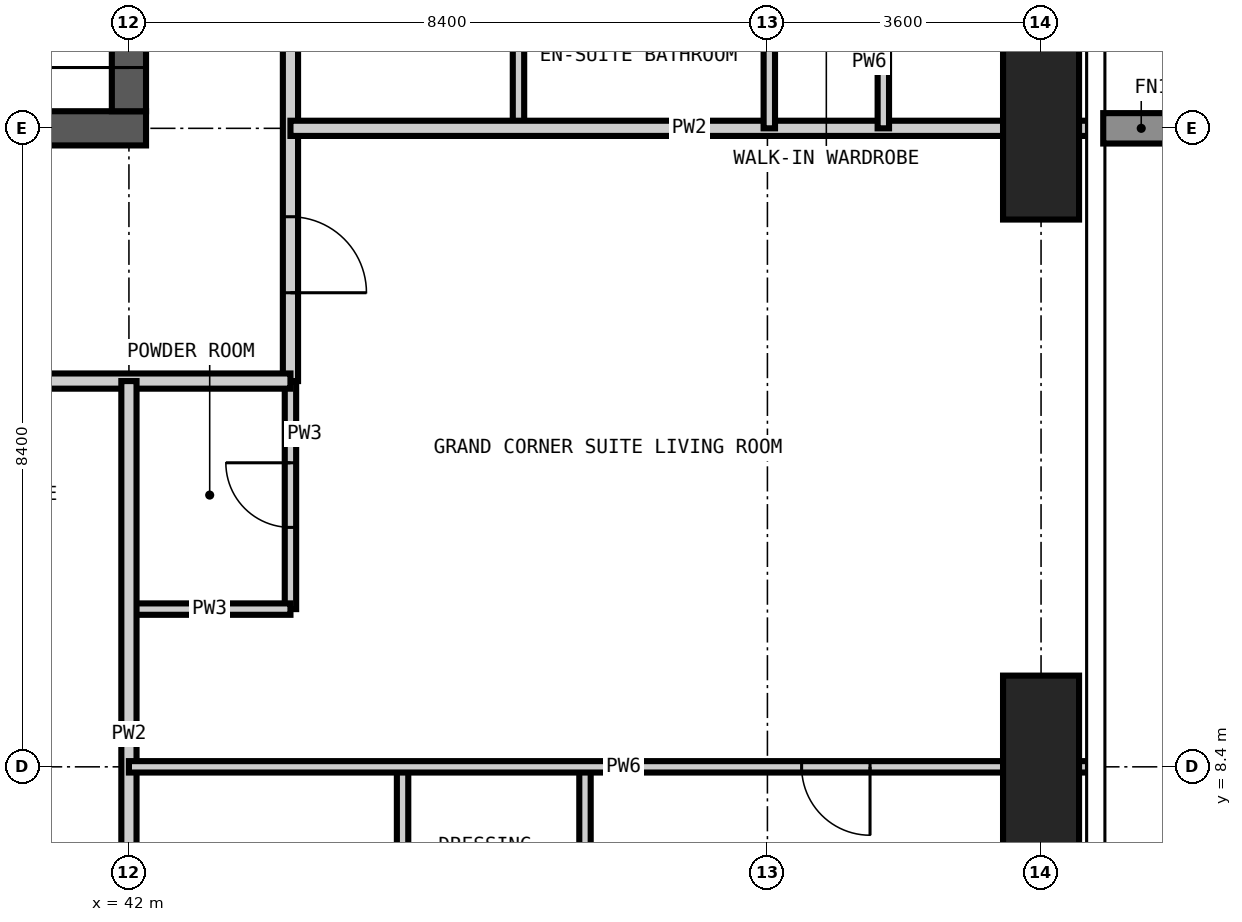
"""IFC4 building model, lengths in metres.
Left out: names, types, materials, properties, quantities, classifications, styles, units other than length and angle.
Written with IfcOpenShell. Run it as: python <this file> out.ifc"""

import sys

from ifc_helpers import new_model, si_unit, direction, frame, frame_2d, origin, origin_2d, place, context, subcontext, project, spatial, rectangle, extrude, element, fill, save


model = new_model("IFC4")
c1 = context("Model", 3, precision=1e-05, world=origin(), true_north=direction((0.0, 1.0)))
c2 = subcontext(c1, "Body", "Model", "MODEL_VIEW")
j1 = project(units=[si_unit("LENGTHUNIT", "METRE"), si_unit("PLANEANGLEUNIT", "RADIAN")], contexts=[c1])
p1 = place(None, origin())
s1 = spatial("IfcSite", under=j1, at=p1, CompositionType="ELEMENT")
p2 = place(p1, origin())
s2 = spatial("IfcBuilding", under=s1, at=p2, CompositionType="ELEMENT")
p3 = place(p2, frame((0.0, 0.0, 241.2)))
s3 = spatial("IfcBuildingStorey", under=s2, at=p3, CompositionType="ELEMENT", Elevation=241.2)
for number, where, z_axis, x_axis in (
    (1, (54.0, 8.4, -0.35), (0.0, 0.0, 1.0), (1.0, 0.0, 0.0)),
    (2, (54.0, 16.8, -0.35), (0.0, 0.0, 1.0), (1.0, 0.0, 0.0)),
):
    element("IfcColumn", number, at=place(p3, frame(where, z_axis=z_axis, x_axis=x_axis)), inside=s3, PredefinedType="COLUMN", context=c2, shape_type="SweptSolid", body=[
        extrude(rectangle(XDim=1.0, YDim=2.4, at=origin_2d()), origin(), (0.0, 0.0, 1.0), 3.9),
    ])
p4 = place(p3, frame((24.975, 16.8, -0.35), z_axis=(0.0, 0.0, 1.0), x_axis=(1.0, 0.0, 0.0)))
e3 = element("IfcWall", 3, at=p4, inside=s3, PredefinedType="SHEAR", context=c2, shape_type="SweptSolid", body=[
    extrude(rectangle(XDim=17.25, YDim=0.45, at=frame_2d((8.625, 0.0))), origin(), (0.0, 0.0, 1.0), 3.9),
])
p5 = place(p4, frame((3.925, 0.0, 0.35)))
e4 = element("IfcOpeningElement", 4, at=p5, cuts=e3, PredefinedType="OPENING", context=c2, shape_type="SweptSolid", body=[
    extrude(rectangle(XDim=1.0, YDim=2.1, at=frame_2d((0.5, 1.05))), frame((0.0, 0.235, 0.0), z_axis=(0.0, -1.0, 0.0), x_axis=(1.0, 0.0, 0.0)), (0.0, 0.0, 1.0), 0.47),
])
p6 = place(p4, frame((10.225, 0.0, 0.35)))
e5 = element("IfcOpeningElement", 5, at=p6, cuts=e3, PredefinedType="OPENING", context=c2, shape_type="SweptSolid", body=[
    extrude(rectangle(XDim=1.0, YDim=2.1, at=frame_2d((0.5, 1.05))), frame((0.0, 0.235, 0.0), z_axis=(0.0, -1.0, 0.0), x_axis=(1.0, 0.0, 0.0)), (0.0, 0.0, 1.0), 0.47),
])
p7 = place(p3, frame((42.0, 17.025, -0.35), z_axis=(0.0, 0.0, 1.0), x_axis=(0.0, 1.0, 0.0)))
e6 = element("IfcWall", 6, at=p7, inside=s3, PredefinedType="SHEAR", context=c2, shape_type="SweptSolid", body=[
    extrude(rectangle(XDim=24.75, YDim=0.45, at=frame_2d((12.375, 0.0))), origin(), (0.0, 0.0, 1.0), 3.9),
])
p8 = place(p7, frame((0.575, 0.0, 0.35)))
e7 = element("IfcOpeningElement", 7, at=p8, cuts=e6, PredefinedType="OPENING", context=c2, shape_type="SweptSolid", body=[
    extrude(rectangle(XDim=1.2, YDim=2.2, at=frame_2d((0.6, 1.1))), frame((0.0, 0.235, 0.0), z_axis=(0.0, -1.0, 0.0), x_axis=(1.0, 0.0, 0.0)), (0.0, 0.0, 1.0), 0.47),
])
p9 = place(p7, frame((11.475, 0.0, 0.35)))
e8 = element("IfcOpeningElement", 8, at=p9, cuts=e6, PredefinedType="OPENING", context=c2, shape_type="SweptSolid", body=[
    extrude(rectangle(XDim=1.8, YDim=2.2, at=frame_2d((0.9, 1.1))), frame((0.0, 0.235, 0.0), z_axis=(0.0, -1.0, 0.0), x_axis=(1.0, 0.0, 0.0)), (0.0, 0.0, 1.0), 0.47),
])
p10 = place(p7, frame((20.275, 0.0, 0.35)))
e9 = element("IfcOpeningElement", 9, at=p10, cuts=e6, PredefinedType="OPENING", context=c2, shape_type="SweptSolid", body=[
    extrude(rectangle(XDim=1.0, YDim=2.1, at=frame_2d((0.5, 1.05))), frame((0.0, 0.235, 0.0), z_axis=(0.0, -1.0, 0.0), x_axis=(1.0, 0.0, 0.0)), (0.0, 0.0, 1.0), 0.47),
])
p11 = place(p3, frame((44.125, 10.475, 0.0), z_axis=(0.0, 0.0, 1.0), x_axis=(0.0, 1.0, 0.0)))
e10 = element("IfcWall", 10, at=p11, inside=s3, PredefinedType="PARTITIONING", context=c2, shape_type="SweptSolid", body=[
    extrude(rectangle(XDim=3.0, YDim=0.15, at=frame_2d((1.5, 0.0))), origin(), (0.0, 0.0, 1.0), 3.55),
])
p12 = place(p11, frame((1.075, 0.0, 0.0)))
e11 = element("IfcOpeningElement", 11, at=p12, cuts=e10, PredefinedType="OPENING", context=c2, shape_type="SweptSolid", body=[
    extrude(rectangle(XDim=0.85, YDim=2.1, at=frame_2d((0.425, 1.05))), frame((0.0, 0.085, 0.0), z_axis=(0.0, -1.0, 0.0), x_axis=(1.0, 0.0, 0.0)), (0.0, 0.0, 1.0), 0.17),
])
p13 = place(p3, frame((47.125, 16.8, 0.0), z_axis=(0.0, 0.0, 1.0), x_axis=(0.0, 1.0, 0.0)))
e12 = element("IfcWall", 12, at=p13, inside=s3, PredefinedType="PARTITIONING", context=c2, shape_type="SweptSolid", body=[
    extrude(rectangle(XDim=3.0, YDim=0.15, at=frame_2d((1.5, 0.0))), origin(), (0.0, 0.0, 1.0), 3.55),
])
p14 = place(p3, frame((42.0, 10.475, 0.0), z_axis=(0.0, 0.0, 1.0), x_axis=(1.0, 0.0, 0.0)))
e13 = element("IfcWall", 13, at=p14, inside=s3, PredefinedType="PARTITIONING", context=c2, shape_type="SweptSolid", body=[
    extrude(rectangle(XDim=2.125, YDim=0.15, at=frame_2d((1.062, 0.0))), origin(), (0.0, 0.0, 1.0), 3.55),
])
p15 = place(p3, frame((44.125, 25.2, 0.0), z_axis=(0.0, 0.0, 1.0), x_axis=(0.0, -1.0, 0.0)))
e14 = element("IfcWall", 14, at=p15, inside=s3, PredefinedType="PARTITIONING", context=c2, shape_type="SweptSolid", body=[
    extrude(rectangle(XDim=11.725, YDim=0.2, at=frame_2d((5.862, 0.0))), origin(), (0.0, 0.0, 1.0), 3.55),
])
p16 = place(p15, frame((3.7, 0.0, 0.0)))
e15 = element("IfcOpeningElement", 15, at=p16, cuts=e14, PredefinedType="OPENING", context=c2, shape_type="SweptSolid", body=[
    extrude(rectangle(XDim=1.0, YDim=2.2, at=frame_2d((0.5, 1.1))), frame((0.0, 0.11, 0.0), z_axis=(0.0, -1.0, 0.0), x_axis=(1.0, 0.0, 0.0)), (0.0, 0.0, 1.0), 0.22),
])
p17 = place(p15, frame((9.563, 0.0, 0.0)))
e16 = element("IfcOpeningElement", 16, at=p17, cuts=e14, PredefinedType="OPENING", context=c2, shape_type="SweptSolid", body=[
    extrude(rectangle(XDim=1.0, YDim=2.2, at=frame_2d((0.5, 1.1))), frame((0.0, 0.11, 0.0), z_axis=(0.0, -1.0, 0.0), x_axis=(1.0, 0.0, 0.0)), (0.0, 0.0, 1.0), 0.22),
])
p18 = place(p3, frame((44.125, 13.475, 0.0), z_axis=(0.0, 0.0, 1.0), x_axis=(-1.0, 0.0, 0.0)))
e17 = element("IfcWall", 17, at=p18, inside=s3, PredefinedType="PARTITIONING", context=c2, shape_type="SweptSolid", body=[
    extrude(rectangle(XDim=22.25, YDim=0.2, at=frame_2d((11.125, 0.0))), origin(), (0.0, 0.0, 1.0), 3.55),
])
p19 = place(p18, frame((16.325, 0.0, 0.0)))
e18 = element("IfcOpeningElement", 18, at=p19, cuts=e17, PredefinedType="OPENING", context=c2, shape_type="SweptSolid", body=[
    extrude(rectangle(XDim=1.0, YDim=2.2, at=frame_2d((0.5, 1.1))), frame((0.0, 0.11, 0.0), z_axis=(0.0, -1.0, 0.0), x_axis=(1.0, 0.0, 0.0)), (0.0, 0.0, 1.0), 0.22),
])
p20 = place(p18, frame((10.025, 0.0, 0.0)))
e19 = element("IfcOpeningElement", 19, at=p20, cuts=e17, PredefinedType="OPENING", context=c2, shape_type="SweptSolid", body=[
    extrude(rectangle(XDim=1.0, YDim=2.2, at=frame_2d((0.5, 1.1))), frame((0.0, 0.11, 0.0), z_axis=(0.0, -1.0, 0.0), x_axis=(1.0, 0.0, 0.0)), (0.0, 0.0, 1.0), 0.22),
])
p21 = place(p18, frame((3.725, 0.0, 0.0)))
e20 = element("IfcOpeningElement", 20, at=p21, cuts=e17, PredefinedType="OPENING", context=c2, shape_type="SweptSolid", body=[
    extrude(rectangle(XDim=1.0, YDim=2.2, at=frame_2d((0.5, 1.1))), frame((0.0, 0.11, 0.0), z_axis=(0.0, -1.0, 0.0), x_axis=(1.0, 0.0, 0.0)), (0.0, 0.0, 1.0), 0.22),
])
p22 = place(p3, frame((42.0, 4.182, 0.0), z_axis=(0.0, 0.0, 1.0), x_axis=(0.0, 1.0, 0.0)))
e21 = element("IfcWall", 21, at=p22, inside=s3, PredefinedType="PARTITIONING", context=c2, shape_type="SweptSolid", body=[
    extrude(rectangle(XDim=9.293, YDim=0.2, at=frame_2d((4.646, 0.0))), origin(), (0.0, 0.0, 1.0), 3.55),
])
p23 = place(p3, frame((44.125, 16.8, 0.0), z_axis=(0.0, 0.0, 1.0), x_axis=(1.0, 0.0, 0.0)))
e22 = element("IfcWall", 22, at=p23, inside=s3, PredefinedType="PARTITIONING", context=c2, shape_type="SweptSolid", body=[
    extrude(rectangle(XDim=10.493, YDim=0.2, at=frame_2d((5.247, 0.0))), origin(), (0.0, 0.0, 1.0), 3.55),
])
p24 = place(p3, frame((45.6, 5.4, 0.0), z_axis=(0.0, 0.0, 1.0), x_axis=(0.0, 1.0, 0.0)))
e23 = element("IfcWall", 23, at=p24, inside=s3, PredefinedType="PARTITIONING", context=c2, shape_type="SweptSolid", body=[
    extrude(rectangle(XDim=3.0, YDim=0.15, at=frame_2d((1.5, 0.0))), origin(), (0.0, 0.0, 1.0), 3.55),
])
p25 = place(p3, frame((48.0, 5.4, 0.0), z_axis=(0.0, 0.0, 1.0), x_axis=(0.0, 1.0, 0.0)))
e24 = element("IfcWall", 24, at=p25, inside=s3, PredefinedType="PARTITIONING", context=c2, shape_type="SweptSolid", body=[
    extrude(rectangle(XDim=3.0, YDim=0.15, at=frame_2d((1.5, 0.0))), origin(), (0.0, 0.0, 1.0), 3.55),
])
p26 = place(p25, frame((1.05, 0.0, 0.0)))
e25 = element("IfcOpeningElement", 25, at=p26, cuts=e24, PredefinedType="OPENING", context=c2, shape_type="SweptSolid", body=[
    extrude(rectangle(XDim=0.9, YDim=2.1, at=frame_2d((0.45, 1.05))), frame((0.0, 0.085, 0.0), z_axis=(0.0, -1.0, 0.0), x_axis=(1.0, 0.0, 0.0)), (0.0, 0.0, 1.0), 0.17),
])
p27 = place(p3, frame((50.425, 16.8, 0.0), z_axis=(0.0, 0.0, 1.0), x_axis=(0.0, 1.0, 0.0)))
e26 = element("IfcWall", 26, at=p27, inside=s3, PredefinedType="PARTITIONING", context=c2, shape_type="SweptSolid", body=[
    extrude(rectangle(XDim=3.0, YDim=0.15, at=frame_2d((1.5, 0.0))), origin(), (0.0, 0.0, 1.0), 3.55),
])
p28 = place(p3, frame((51.925, 16.8, 0.0), z_axis=(0.0, 0.0, 1.0), x_axis=(0.0, 1.0, 0.0)))
e27 = element("IfcWall", 27, at=p28, inside=s3, PredefinedType="PARTITIONING", context=c2, shape_type="SweptSolid", body=[
    extrude(rectangle(XDim=3.0, YDim=0.15, at=frame_2d((1.5, 0.0))), origin(), (0.0, 0.0, 1.0), 3.55),
])
p29 = place(p28, frame((1.25, 0.0, 0.0)))
e28 = element("IfcOpeningElement", 28, at=p29, cuts=e27, PredefinedType="OPENING", context=c2, shape_type="SweptSolid", body=[
    extrude(rectangle(XDim=0.9, YDim=2.1, at=frame_2d((0.45, 1.05))), frame((0.0, 0.085, 0.0), z_axis=(0.0, -1.0, 0.0), x_axis=(1.0, 0.0, 0.0)), (0.0, 0.0, 1.0), 0.17),
])
p30 = place(p3, frame((42.0, 8.4, 0.0), z_axis=(0.0, 0.0, 1.0), x_axis=(1.0, 0.0, 0.0)))
e29 = element("IfcWall", 29, at=p30, inside=s3, PredefinedType="PARTITIONING", context=c2, shape_type="SweptSolid", body=[
    extrude(rectangle(XDim=12.618, YDim=0.15, at=frame_2d((6.309, 0.0))), origin(), (0.0, 0.0, 1.0), 3.55),
])
p31 = place(p30, frame((8.85, 0.0, 0.0)))
e30 = element("IfcOpeningElement", 30, at=p31, cuts=e29, PredefinedType="OPENING", context=c2, shape_type="SweptSolid", body=[
    extrude(rectangle(XDim=0.9, YDim=2.1, at=frame_2d((0.45, 1.05))), frame((0.0, 0.085, 0.0), z_axis=(0.0, -1.0, 0.0), x_axis=(1.0, 0.0, 0.0)), (0.0, 0.0, 1.0), 0.17),
])
p32 = place(p8, origin())
e31 = element("IfcDoor", 31, at=p32, inside=s3, OperationType="SINGLE_SWING_LEFT", PredefinedType="DOOR", context=c2, shape_type="SweptSolid", body=[
    extrude(rectangle(XDim=1.2, YDim=2.2, at=frame_2d((0.6, 1.1))), frame((0.0, 0.025, 0.0), z_axis=(0.0, -1.0, 0.0), x_axis=(1.0, 0.0, 0.0)), (0.0, 0.0, 1.0), 0.05),
])
fill(e7, e31)
p33 = place(p17, origin())
e32 = element("IfcDoor", 32, at=p33, inside=s3, OperationType="SINGLE_SWING_RIGHT", PredefinedType="DOOR", context=c2, shape_type="SweptSolid", body=[
    extrude(rectangle(XDim=1.0, YDim=2.2, at=frame_2d((0.5, 1.1))), frame((0.0, 0.025, 0.0), z_axis=(0.0, -1.0, 0.0), x_axis=(1.0, 0.0, 0.0)), (0.0, 0.0, 1.0), 0.05),
])
fill(e16, e32)
p34 = place(p12, origin())
e33 = element("IfcDoor", 33, at=p34, inside=s3, OperationType="SINGLE_SWING_RIGHT", PredefinedType="DOOR", context=c2, shape_type="SweptSolid", body=[
    extrude(rectangle(XDim=0.85, YDim=2.1, at=frame_2d((0.425, 1.05))), frame((0.0, 0.025, 0.0), z_axis=(0.0, -1.0, 0.0), x_axis=(1.0, 0.0, 0.0)), (0.0, 0.0, 1.0), 0.05),
])
fill(e11, e33)
p35 = place(p31, frame((0.9, 0.0, 0.0), z_axis=(0.0, 0.0, 1.0), x_axis=(-1.0, 0.0, 0.0)))
e34 = element("IfcDoor", 34, at=p35, inside=s3, OperationType="SINGLE_SWING_LEFT", PredefinedType="DOOR", context=c2, shape_type="SweptSolid", body=[
    extrude(rectangle(XDim=0.9, YDim=2.1, at=frame_2d((0.45, 1.05))), frame((0.0, 0.025, 0.0), z_axis=(0.0, -1.0, 0.0), x_axis=(1.0, 0.0, 0.0)), (0.0, 0.0, 1.0), 0.05),
])
fill(e30, e34)
save(model, sys.argv[1])
